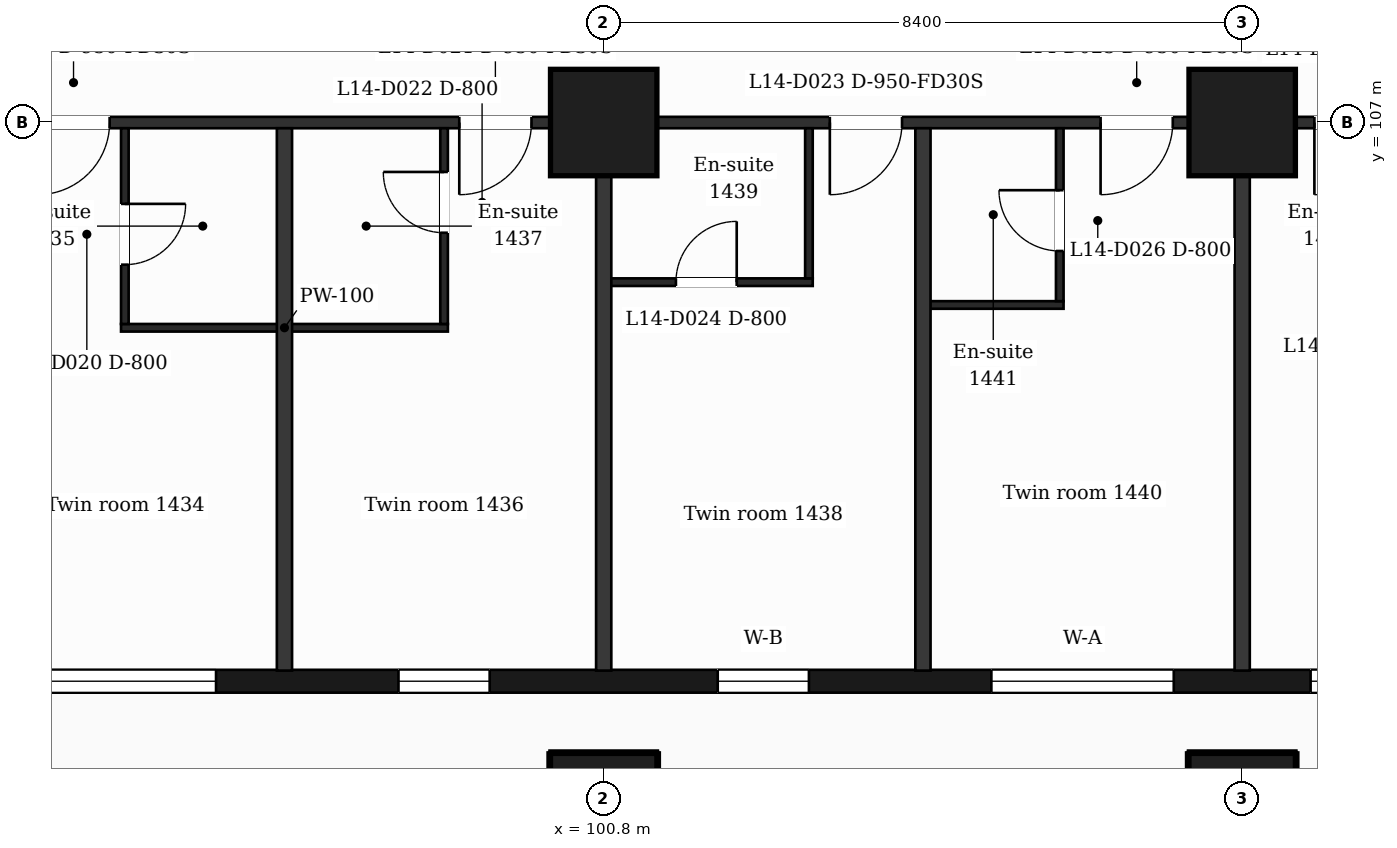
"""IFC4 building model, lengths in metres.
Left out: names, types, materials, properties, quantities, classifications, styles, units other than length and angle.
Written with IfcOpenShell. Run it as: python <this file> out.ifc"""

import sys

from ifc_helpers import new_model, si_unit, direction, frame, frame_2d, origin, origin_2d, place, context, subcontext, project, spatial, rectangle, extrude, element, fill, save


model = new_model("IFC4")
c1 = context("Model", 3, precision=1e-05, world=origin(), true_north=direction((0.0, 1.0)))
c2 = subcontext(c1, "Body", "Model", "MODEL_VIEW")
j1 = project(units=[si_unit("LENGTHUNIT", "METRE"), si_unit("PLANEANGLEUNIT", "RADIAN")], contexts=[c1])
p1 = place(None, origin())
s1 = spatial("IfcSite", under=j1, at=p1, CompositionType="ELEMENT")
p2 = place(p1, origin())
s2 = spatial("IfcBuilding", under=s1, at=p2, CompositionType="ELEMENT")
p3 = place(p2, frame((0.0, 0.0, 67.0)))
s3 = spatial("IfcBuildingStorey", under=s2, at=p3, CompositionType="ELEMENT", Elevation=67.0)
for number, where, z_axis, x_axis in (
    (1, (100.8, 98.0, 0.0), (0.0, 0.0, 1.0), (1.0, 0.0, 0.0)),
    (2, (109.2, 98.0, 0.0), (0.0, 0.0, 1.0), (1.0, 0.0, 0.0)),
    (3, (100.8, 107.0, 0.0), (0.0, 0.0, 1.0), (1.0, 0.0, 0.0)),
    (4, (109.2, 107.0, 0.0), (0.0, 0.0, 1.0), (1.0, 0.0, 0.0)),
):
    element("IfcColumn", number, at=place(p3, frame(where, z_axis=z_axis, x_axis=x_axis)), inside=s3, PredefinedType="COLUMN", context=c2, shape_type="SweptSolid", body=[
        extrude(rectangle(XDim=1.4, YDim=1.4, at=origin_2d()), origin(), (0.0, 0.0, 1.0), 3.5),
    ])
p4 = place(p3, frame((89.85, 99.65, 0.0), z_axis=(0.0, 0.0, 1.0), x_axis=(1.0, 0.0, 0.0)))
e5 = element("IfcWall", 5, at=p4, inside=s3, PredefinedType="SOLIDWALL", context=c2, shape_type="SweptSolid", body=[
    extrude(rectangle(XDim=47.25, YDim=0.3, at=frame_2d((23.625, 0.0))), origin(), (0.0, 0.0, 1.0), 3.18),
])
p5 = place(p4, frame((0.725, 0.0, 0.9)))
e6 = element("IfcOpeningElement", 6, at=p5, cuts=e5, PredefinedType="OPENING", context=c2, shape_type="SweptSolid", body=[
    extrude(rectangle(XDim=1.2, YDim=2.1, at=frame_2d((0.6, 1.05))), frame((0.0, 0.16, 0.0), z_axis=(0.0, -1.0, 0.0), x_axis=(1.0, 0.0, 0.0)), (0.0, 0.0, 1.0), 0.32),
])
p6 = place(p4, frame((3.45, 0.0, 0.9)))
e7 = element("IfcOpeningElement", 7, at=p6, cuts=e5, PredefinedType="OPENING", context=c2, shape_type="SweptSolid", body=[
    extrude(rectangle(XDim=2.4, YDim=2.1, at=frame_2d((1.2, 1.05))), frame((0.0, 0.16, 0.0), z_axis=(0.0, -1.0, 0.0), x_axis=(1.0, 0.0, 0.0)), (0.0, 0.0, 1.0), 0.32),
])
p7 = place(p4, frame((8.25, 0.0, 0.9)))
e8 = element("IfcOpeningElement", 8, at=p7, cuts=e5, PredefinedType="OPENING", context=c2, shape_type="SweptSolid", body=[
    extrude(rectangle(XDim=1.2, YDim=2.1, at=frame_2d((0.6, 1.05))), frame((0.0, 0.16, 0.0), z_axis=(0.0, -1.0, 0.0), x_axis=(1.0, 0.0, 0.0)), (0.0, 0.0, 1.0), 0.32),
])
p8 = place(p4, frame((12.45, 0.0, 0.9)))
e9 = element("IfcOpeningElement", 9, at=p8, cuts=e5, PredefinedType="OPENING", context=c2, shape_type="SweptSolid", body=[
    extrude(rectangle(XDim=1.2, YDim=2.1, at=frame_2d((0.6, 1.05))), frame((0.0, 0.16, 0.0), z_axis=(0.0, -1.0, 0.0), x_axis=(1.0, 0.0, 0.0)), (0.0, 0.0, 1.0), 0.32),
])
p9 = place(p4, frame((16.05, 0.0, 0.9)))
e10 = element("IfcOpeningElement", 10, at=p9, cuts=e5, PredefinedType="OPENING", context=c2, shape_type="SweptSolid", body=[
    extrude(rectangle(XDim=2.4, YDim=2.1, at=frame_2d((1.2, 1.05))), frame((0.0, 0.16, 0.0), z_axis=(0.0, -1.0, 0.0), x_axis=(1.0, 0.0, 0.0)), (0.0, 0.0, 1.0), 0.32),
])
p10 = place(p4, frame((20.25, 0.0, 0.9)))
e11 = element("IfcOpeningElement", 11, at=p10, cuts=e5, PredefinedType="OPENING", context=c2, shape_type="SweptSolid", body=[
    extrude(rectangle(XDim=2.4, YDim=2.1, at=frame_2d((1.2, 1.05))), frame((0.0, 0.16, 0.0), z_axis=(0.0, -1.0, 0.0), x_axis=(1.0, 0.0, 0.0)), (0.0, 0.0, 1.0), 0.32),
])
p11 = place(p4, frame((25.05, 0.0, 0.0)))
e12 = element("IfcOpeningElement", 12, at=p11, cuts=e5, PredefinedType="OPENING", context=c2, shape_type="SweptSolid", body=[
    extrude(rectangle(XDim=1.2, YDim=2.4, at=frame_2d((0.6, 1.2))), frame((0.0, 0.16, 0.0), z_axis=(0.0, -1.0, 0.0), x_axis=(1.0, 0.0, 0.0)), (0.0, 0.0, 1.0), 0.32),
])
p12 = place(p4, frame((28.65, 0.0, 0.9)))
e13 = element("IfcOpeningElement", 13, at=p12, cuts=e5, PredefinedType="OPENING", context=c2, shape_type="SweptSolid", body=[
    extrude(rectangle(XDim=2.4, YDim=2.1, at=frame_2d((1.2, 1.05))), frame((0.0, 0.16, 0.0), z_axis=(0.0, -1.0, 0.0), x_axis=(1.0, 0.0, 0.0)), (0.0, 0.0, 1.0), 0.32),
])
p13 = place(p4, frame((32.85, 0.0, 0.9)))
e14 = element("IfcOpeningElement", 14, at=p13, cuts=e5, PredefinedType="OPENING", context=c2, shape_type="SweptSolid", body=[
    extrude(rectangle(XDim=2.4, YDim=2.1, at=frame_2d((1.2, 1.05))), frame((0.0, 0.16, 0.0), z_axis=(0.0, -1.0, 0.0), x_axis=(1.0, 0.0, 0.0)), (0.0, 0.0, 1.0), 0.32),
])
p14 = place(p4, frame((37.65, 0.0, 0.9)))
e15 = element("IfcOpeningElement", 15, at=p14, cuts=e5, PredefinedType="OPENING", context=c2, shape_type="SweptSolid", body=[
    extrude(rectangle(XDim=1.2, YDim=2.1, at=frame_2d((0.6, 1.05))), frame((0.0, 0.16, 0.0), z_axis=(0.0, -1.0, 0.0), x_axis=(1.0, 0.0, 0.0)), (0.0, 0.0, 1.0), 0.32),
])
p15 = place(p4, frame((41.85, 0.0, 0.9)))
e16 = element("IfcOpeningElement", 16, at=p15, cuts=e5, PredefinedType="OPENING", context=c2, shape_type="SweptSolid", body=[
    extrude(rectangle(XDim=1.2, YDim=2.1, at=frame_2d((0.6, 1.05))), frame((0.0, 0.16, 0.0), z_axis=(0.0, -1.0, 0.0), x_axis=(1.0, 0.0, 0.0)), (0.0, 0.0, 1.0), 0.32),
])
p16 = place(p4, frame((45.25, 0.0, 0.9)))
e17 = element("IfcOpeningElement", 17, at=p16, cuts=e5, PredefinedType="OPENING", context=c2, shape_type="SweptSolid", body=[
    extrude(rectangle(XDim=1.2, YDim=2.1, at=frame_2d((0.6, 1.05))), frame((0.0, 0.16, 0.0), z_axis=(0.0, -1.0, 0.0), x_axis=(1.0, 0.0, 0.0)), (0.0, 0.0, 1.0), 0.32),
])
p17 = place(p3, frame((94.45, 104.3, 0.0), z_axis=(0.0, 0.0, 1.0), x_axis=(1.0, 0.0, 0.0)))
e18 = element("IfcWall", 18, at=p17, inside=s3, PredefinedType="PARTITIONING", context=c2, shape_type="SweptSolid", body=[
    extrude(rectangle(XDim=4.3, YDim=0.1, at=frame_2d((2.15, 0.0))), origin(), (0.0, 0.0, 1.0), 3.18),
])
p18 = place(p3, frame((105.0, 104.6, 0.0), z_axis=(0.0, 0.0, 1.0), x_axis=(1.0, 0.0, 0.0)))
e19 = element("IfcWall", 19, at=p18, inside=s3, PredefinedType="PARTITIONING", context=c2, shape_type="SweptSolid", body=[
    extrude(rectangle(XDim=1.85, YDim=0.1, at=frame_2d((0.925, 0.0))), origin(), (0.0, 0.0, 1.0), 3.18),
])
p19 = place(p3, frame((100.8, 104.9, 0.0), z_axis=(0.0, 0.0, 1.0), x_axis=(1.0, 0.0, 0.0)))
e20 = element("IfcWall", 20, at=p19, inside=s3, PredefinedType="PARTITIONING", context=c2, shape_type="SweptSolid", body=[
    extrude(rectangle(XDim=2.75, YDim=0.1, at=frame_2d((1.375, 0.0))), origin(), (0.0, 0.0, 1.0), 3.18),
])
p20 = place(p19, frame((0.95, 0.0, 0.0)))
e21 = element("IfcOpeningElement", 21, at=p20, cuts=e20, PredefinedType="OPENING", context=c2, shape_type="SweptSolid", body=[
    extrude(rectangle(XDim=0.8, YDim=2.1, at=frame_2d((0.4, 1.05))), frame((0.0, 0.06, 0.0), z_axis=(0.0, -1.0, 0.0), x_axis=(1.0, 0.0, 0.0)), (0.0, 0.0, 1.0), 0.12),
])
p21 = place(p3, frame((87.018, 107.0, 0.0), z_axis=(0.0, 0.0, 1.0), x_axis=(1.0, 0.0, 0.0)))
e22 = element("IfcWall", 22, at=p21, inside=s3, PredefinedType="PARTITIONING", context=c2, shape_type="SweptSolid", body=[
    extrude(rectangle(XDim=52.765, YDim=0.15, at=frame_2d((26.382, 0.0))), origin(), (0.0, 0.0, 1.0), 3.18),
])
p22 = place(p21, frame((0.87, 0.0, 0.0)))
e23 = element("IfcOpeningElement", 23, at=p22, cuts=e22, PredefinedType="OPENING", context=c2, shape_type="SweptSolid", body=[
    extrude(rectangle(XDim=0.95, YDim=2.1, at=frame_2d((0.475, 1.05))), frame((0.0, 0.085, 0.0), z_axis=(0.0, -1.0, 0.0), x_axis=(1.0, 0.0, 0.0)), (0.0, 0.0, 1.0), 0.17),
])
p23 = place(p21, frame((6.332, 0.0, 0.0)))
e24 = element("IfcOpeningElement", 24, at=p23, cuts=e22, PredefinedType="OPENING", context=c2, shape_type="SweptSolid", body=[
    extrude(rectangle(XDim=0.95, YDim=2.1, at=frame_2d((0.475, 1.05))), frame((0.0, 0.085, 0.0), z_axis=(0.0, -1.0, 0.0), x_axis=(1.0, 0.0, 0.0)), (0.0, 0.0, 1.0), 0.17),
])
p24 = place(p21, frame((11.882, 0.0, 0.0)))
e25 = element("IfcOpeningElement", 25, at=p24, cuts=e22, PredefinedType="OPENING", context=c2, shape_type="SweptSolid", body=[
    extrude(rectangle(XDim=0.95, YDim=2.1, at=frame_2d((0.475, 1.05))), frame((0.0, 0.085, 0.0), z_axis=(0.0, -1.0, 0.0), x_axis=(1.0, 0.0, 0.0)), (0.0, 0.0, 1.0), 0.17),
])
p25 = place(p21, frame((16.757, 0.0, 0.0)))
e26 = element("IfcOpeningElement", 26, at=p25, cuts=e22, PredefinedType="OPENING", context=c2, shape_type="SweptSolid", body=[
    extrude(rectangle(XDim=0.95, YDim=2.1, at=frame_2d((0.475, 1.05))), frame((0.0, 0.085, 0.0), z_axis=(0.0, -1.0, 0.0), x_axis=(1.0, 0.0, 0.0)), (0.0, 0.0, 1.0), 0.17),
])
p26 = place(p21, frame((20.319, 0.0, 0.0)))
e27 = element("IfcOpeningElement", 27, at=p26, cuts=e22, PredefinedType="OPENING", context=c2, shape_type="SweptSolid", body=[
    extrude(rectangle(XDim=0.95, YDim=2.1, at=frame_2d((0.475, 1.05))), frame((0.0, 0.085, 0.0), z_axis=(0.0, -1.0, 0.0), x_axis=(1.0, 0.0, 0.0)), (0.0, 0.0, 1.0), 0.17),
])
p27 = place(p21, frame((23.132, 0.0, 0.0)))
e28 = element("IfcOpeningElement", 28, at=p27, cuts=e22, PredefinedType="OPENING", context=c2, shape_type="SweptSolid", body=[
    extrude(rectangle(XDim=0.95, YDim=2.1, at=frame_2d((0.475, 1.05))), frame((0.0, 0.085, 0.0), z_axis=(0.0, -1.0, 0.0), x_axis=(1.0, 0.0, 0.0)), (0.0, 0.0, 1.0), 0.17),
])
p28 = place(p21, frame((26.657, 0.0, 0.0)))
e29 = element("IfcOpeningElement", 29, at=p28, cuts=e22, PredefinedType="OPENING", context=c2, shape_type="SweptSolid", body=[
    extrude(rectangle(XDim=0.95, YDim=2.1, at=frame_2d((0.475, 1.05))), frame((0.0, 0.085, 0.0), z_axis=(0.0, -1.0, 0.0), x_axis=(1.0, 0.0, 0.0)), (0.0, 0.0, 1.0), 0.17),
])
p29 = place(p21, frame((34.952, 0.0, 0.0)))
e30 = element("IfcOpeningElement", 30, at=p29, cuts=e22, PredefinedType="OPENING", context=c2, shape_type="SweptSolid", body=[
    extrude(rectangle(XDim=1.0, YDim=2.1, at=frame_2d((0.5, 1.05))), frame((0.0, 0.085, 0.0), z_axis=(0.0, -1.0, 0.0), x_axis=(1.0, 0.0, 0.0)), (0.0, 0.0, 1.0), 0.17),
])
p30 = place(p21, frame((45.062, 0.0, 0.0)))
e31 = element("IfcOpeningElement", 31, at=p30, cuts=e22, PredefinedType="OPENING", context=c2, shape_type="SweptSolid", body=[
    extrude(rectangle(XDim=0.95, YDim=2.1, at=frame_2d((0.475, 1.05))), frame((0.0, 0.085, 0.0), z_axis=(0.0, -1.0, 0.0), x_axis=(1.0, 0.0, 0.0)), (0.0, 0.0, 1.0), 0.17),
])
p31 = place(p21, frame((49.285, 0.0, 0.0)))
e32 = element("IfcOpeningElement", 32, at=p31, cuts=e22, PredefinedType="OPENING", context=c2, shape_type="SweptSolid", body=[
    extrude(rectangle(XDim=0.95, YDim=2.1, at=frame_2d((0.475, 1.05))), frame((0.0, 0.085, 0.0), z_axis=(0.0, -1.0, 0.0), x_axis=(1.0, 0.0, 0.0)), (0.0, 0.0, 1.0), 0.17),
])
p32 = place(p3, frame((94.5, 104.35, 0.0), z_axis=(0.0, 0.0, 1.0), x_axis=(0.0, 1.0, 0.0)))
e33 = element("IfcWall", 33, at=p32, inside=s3, PredefinedType="PARTITIONING", context=c2, shape_type="SweptSolid", body=[
    extrude(rectangle(XDim=2.575, YDim=0.1, at=frame_2d((1.288, 0.0))), origin(), (0.0, 0.0, 1.0), 3.18),
])
p33 = place(p32, frame((0.78, 0.0, 0.0)))
e34 = element("IfcOpeningElement", 34, at=p33, cuts=e33, PredefinedType="OPENING", context=c2, shape_type="SweptSolid", body=[
    extrude(rectangle(XDim=0.8, YDim=2.1, at=frame_2d((0.4, 1.05))), frame((0.0, 0.06, 0.0), z_axis=(0.0, -1.0, 0.0), x_axis=(1.0, 0.0, 0.0)), (0.0, 0.0, 1.0), 0.12),
])
p34 = place(p3, frame((96.6, 99.79, 0.0), z_axis=(0.0, 0.0, 1.0), x_axis=(0.0, 1.0, 0.0)))
e35 = element("IfcWall", 35, at=p34, inside=s3, PredefinedType="PARTITIONING", context=c2, shape_type="SweptSolid", body=[
    extrude(rectangle(XDim=7.135, YDim=0.2, at=frame_2d((3.567, 0.0))), origin(), (0.0, 0.0, 1.0), 3.18),
])
p35 = place(p3, frame((98.7, 104.35, 0.0), z_axis=(0.0, 0.0, 1.0), x_axis=(0.0, 1.0, 0.0)))
e36 = element("IfcWall", 36, at=p35, inside=s3, PredefinedType="PARTITIONING", context=c2, shape_type="SweptSolid", body=[
    extrude(rectangle(XDim=2.575, YDim=0.1, at=frame_2d((1.288, 0.0))), origin(), (0.0, 0.0, 1.0), 3.18),
])
p36 = place(p35, frame((1.2, 0.0, 0.0)))
e37 = element("IfcOpeningElement", 37, at=p36, cuts=e36, PredefinedType="OPENING", context=c2, shape_type="SweptSolid", body=[
    extrude(rectangle(XDim=0.8, YDim=2.1, at=frame_2d((0.4, 1.05))), frame((0.0, 0.06, 0.0), z_axis=(0.0, -1.0, 0.0), x_axis=(1.0, 0.0, 0.0)), (0.0, 0.0, 1.0), 0.12),
])
p37 = place(p3, frame((100.8, 99.79, 0.0), z_axis=(0.0, 0.0, 1.0), x_axis=(0.0, 1.0, 0.0)))
e38 = element("IfcWall", 38, at=p37, inside=s3, PredefinedType="PARTITIONING", context=c2, shape_type="SweptSolid", body=[
    extrude(rectangle(XDim=7.135, YDim=0.2, at=frame_2d((3.567, 0.0))), origin(), (0.0, 0.0, 1.0), 3.18),
])
p38 = place(p3, frame((103.5, 104.95, 0.0), z_axis=(0.0, 0.0, 1.0), x_axis=(0.0, 1.0, 0.0)))
e39 = element("IfcWall", 39, at=p38, inside=s3, PredefinedType="PARTITIONING", context=c2, shape_type="SweptSolid", body=[
    extrude(rectangle(XDim=1.975, YDim=0.1, at=frame_2d((0.988, 0.0))), origin(), (0.0, 0.0, 1.0), 3.18),
])
p39 = place(p3, frame((105.0, 99.79, 0.0), z_axis=(0.0, 0.0, 1.0), x_axis=(0.0, 1.0, 0.0)))
e40 = element("IfcWall", 40, at=p39, inside=s3, PredefinedType="PARTITIONING", context=c2, shape_type="SweptSolid", body=[
    extrude(rectangle(XDim=7.135, YDim=0.2, at=frame_2d((3.567, 0.0))), origin(), (0.0, 0.0, 1.0), 3.18),
])
p40 = place(p3, frame((106.8, 104.65, 0.0), z_axis=(0.0, 0.0, 1.0), x_axis=(0.0, 1.0, 0.0)))
e41 = element("IfcWall", 41, at=p40, inside=s3, PredefinedType="PARTITIONING", context=c2, shape_type="SweptSolid", body=[
    extrude(rectangle(XDim=2.275, YDim=0.1, at=frame_2d((1.138, 0.0))), origin(), (0.0, 0.0, 1.0), 3.18),
])
p41 = place(p40, frame((0.66, 0.0, 0.0)))
e42 = element("IfcOpeningElement", 42, at=p41, cuts=e41, PredefinedType="OPENING", context=c2, shape_type="SweptSolid", body=[
    extrude(rectangle(XDim=0.8, YDim=2.1, at=frame_2d((0.4, 1.05))), frame((0.0, 0.06, 0.0), z_axis=(0.0, -1.0, 0.0), x_axis=(1.0, 0.0, 0.0)), (0.0, 0.0, 1.0), 0.12),
])
p42 = place(p3, frame((109.2, 99.79, 0.0), z_axis=(0.0, 0.0, 1.0), x_axis=(0.0, 1.0, 0.0)))
e43 = element("IfcWall", 43, at=p42, inside=s3, PredefinedType="PARTITIONING", context=c2, shape_type="SweptSolid", body=[
    extrude(rectangle(XDim=7.135, YDim=0.2, at=frame_2d((3.567, 0.0))), origin(), (0.0, 0.0, 1.0), 3.18),
])
p43 = place(p6, origin())
e44 = element("IfcWindow", 44, at=p43, inside=s3, PartitioningType="SINGLE_PANEL", PredefinedType="WINDOW", context=c2, shape_type="SweptSolid", body=[
    extrude(rectangle(XDim=2.4, YDim=2.1, at=frame_2d((1.2, 1.05))), frame((0.0, 0.03, 0.0), z_axis=(0.0, -1.0, 0.0), x_axis=(1.0, 0.0, 0.0)), (0.0, 0.0, 1.0), 0.06),
])
fill(e7, e44)
p44 = place(p7, origin())
e45 = element("IfcWindow", 45, at=p44, inside=s3, PartitioningType="SINGLE_PANEL", PredefinedType="WINDOW", context=c2, shape_type="SweptSolid", body=[
    extrude(rectangle(XDim=1.2, YDim=2.1, at=frame_2d((0.6, 1.05))), frame((0.0, 0.03, 0.0), z_axis=(0.0, -1.0, 0.0), x_axis=(1.0, 0.0, 0.0)), (0.0, 0.0, 1.0), 0.06),
])
fill(e8, e45)
p45 = place(p8, origin())
e46 = element("IfcWindow", 46, at=p45, inside=s3, PartitioningType="SINGLE_PANEL", PredefinedType="WINDOW", context=c2, shape_type="SweptSolid", body=[
    extrude(rectangle(XDim=1.2, YDim=2.1, at=frame_2d((0.6, 1.05))), frame((0.0, 0.03, 0.0), z_axis=(0.0, -1.0, 0.0), x_axis=(1.0, 0.0, 0.0)), (0.0, 0.0, 1.0), 0.06),
])
fill(e9, e46)
p46 = place(p9, origin())
e47 = element("IfcWindow", 47, at=p46, inside=s3, PartitioningType="SINGLE_PANEL", PredefinedType="WINDOW", context=c2, shape_type="SweptSolid", body=[
    extrude(rectangle(XDim=2.4, YDim=2.1, at=frame_2d((1.2, 1.05))), frame((0.0, 0.03, 0.0), z_axis=(0.0, -1.0, 0.0), x_axis=(1.0, 0.0, 0.0)), (0.0, 0.0, 1.0), 0.06),
])
fill(e10, e47)
p47 = place(p10, origin())
e48 = element("IfcWindow", 48, at=p47, inside=s3, PartitioningType="SINGLE_PANEL", PredefinedType="WINDOW", context=c2, shape_type="SweptSolid", body=[
    extrude(rectangle(XDim=2.4, YDim=2.1, at=frame_2d((1.2, 1.05))), frame((0.0, 0.03, 0.0), z_axis=(0.0, -1.0, 0.0), x_axis=(1.0, 0.0, 0.0)), (0.0, 0.0, 1.0), 0.06),
])
fill(e11, e48)
p48 = place(p23, origin())
e49 = element("IfcDoor", 49, at=p48, inside=s3, OperationType="SINGLE_SWING_LEFT", PredefinedType="DOOR", context=c2, shape_type="SweptSolid", body=[
    extrude(rectangle(XDim=0.95, YDim=2.1, at=frame_2d((0.475, 1.05))), frame((0.0, 0.025, 0.0), z_axis=(0.0, -1.0, 0.0), x_axis=(1.0, 0.0, 0.0)), (0.0, 0.0, 1.0), 0.05),
])
fill(e24, e49)
p49 = place(p33, origin())
e50 = element("IfcDoor", 50, at=p49, inside=s3, OperationType="SINGLE_SWING_RIGHT", PredefinedType="DOOR", context=c2, shape_type="SweptSolid", body=[
    extrude(rectangle(XDim=0.8, YDim=2.1, at=frame_2d((0.4, 1.05))), frame((0.0, 0.025, 0.0), z_axis=(0.0, -1.0, 0.0), x_axis=(1.0, 0.0, 0.0)), (0.0, 0.0, 1.0), 0.05),
])
fill(e34, e50)
p50 = place(p24, origin())
e51 = element("IfcDoor", 51, at=p50, inside=s3, OperationType="SINGLE_SWING_LEFT", PredefinedType="DOOR", context=c2, shape_type="SweptSolid", body=[
    extrude(rectangle(XDim=0.95, YDim=2.1, at=frame_2d((0.475, 1.05))), frame((0.0, 0.025, 0.0), z_axis=(0.0, -1.0, 0.0), x_axis=(1.0, 0.0, 0.0)), (0.0, 0.0, 1.0), 0.05),
])
fill(e25, e51)
p51 = place(p36, origin())
e52 = element("IfcDoor", 52, at=p51, inside=s3, OperationType="SINGLE_SWING_RIGHT", PredefinedType="DOOR", context=c2, shape_type="SweptSolid", body=[
    extrude(rectangle(XDim=0.8, YDim=2.1, at=frame_2d((0.4, 1.05))), frame((0.0, 0.025, 0.0), z_axis=(0.0, -1.0, 0.0), x_axis=(1.0, 0.0, 0.0)), (0.0, 0.0, 1.0), 0.05),
])
fill(e37, e52)
p52 = place(p25, origin())
e53 = element("IfcDoor", 53, at=p52, inside=s3, OperationType="SINGLE_SWING_LEFT", PredefinedType="DOOR", context=c2, shape_type="SweptSolid", body=[
    extrude(rectangle(XDim=0.95, YDim=2.1, at=frame_2d((0.475, 1.05))), frame((0.0, 0.025, 0.0), z_axis=(0.0, -1.0, 0.0), x_axis=(1.0, 0.0, 0.0)), (0.0, 0.0, 1.0), 0.05),
])
fill(e26, e53)
p53 = place(p20, origin())
e54 = element("IfcDoor", 54, at=p53, inside=s3, OperationType="SINGLE_SWING_RIGHT", PredefinedType="DOOR", context=c2, shape_type="SweptSolid", body=[
    extrude(rectangle(XDim=0.8, YDim=2.1, at=frame_2d((0.4, 1.05))), frame((0.0, 0.025, 0.0), z_axis=(0.0, -1.0, 0.0), x_axis=(1.0, 0.0, 0.0)), (0.0, 0.0, 1.0), 0.05),
])
fill(e21, e54)
p54 = place(p26, origin())
e55 = element("IfcDoor", 55, at=p54, inside=s3, OperationType="SINGLE_SWING_LEFT", PredefinedType="DOOR", context=c2, shape_type="SweptSolid", body=[
    extrude(rectangle(XDim=0.95, YDim=2.1, at=frame_2d((0.475, 1.05))), frame((0.0, 0.025, 0.0), z_axis=(0.0, -1.0, 0.0), x_axis=(1.0, 0.0, 0.0)), (0.0, 0.0, 1.0), 0.05),
])
fill(e27, e55)
p55 = place(p41, origin())
e56 = element("IfcDoor", 56, at=p55, inside=s3, OperationType="SINGLE_SWING_RIGHT", PredefinedType="DOOR", context=c2, shape_type="SweptSolid", body=[
    extrude(rectangle(XDim=0.8, YDim=2.1, at=frame_2d((0.4, 1.05))), frame((0.0, 0.025, 0.0), z_axis=(0.0, -1.0, 0.0), x_axis=(1.0, 0.0, 0.0)), (0.0, 0.0, 1.0), 0.05),
])
fill(e42, e56)
p56 = place(p27, origin())
e57 = element("IfcDoor", 57, at=p56, inside=s3, OperationType="SINGLE_SWING_LEFT", PredefinedType="DOOR", context=c2, shape_type="SweptSolid", body=[
    extrude(rectangle(XDim=0.95, YDim=2.1, at=frame_2d((0.475, 1.05))), frame((0.0, 0.025, 0.0), z_axis=(0.0, -1.0, 0.0), x_axis=(1.0, 0.0, 0.0)), (0.0, 0.0, 1.0), 0.05),
])
fill(e28, e57)
save(model, sys.argv[1])
